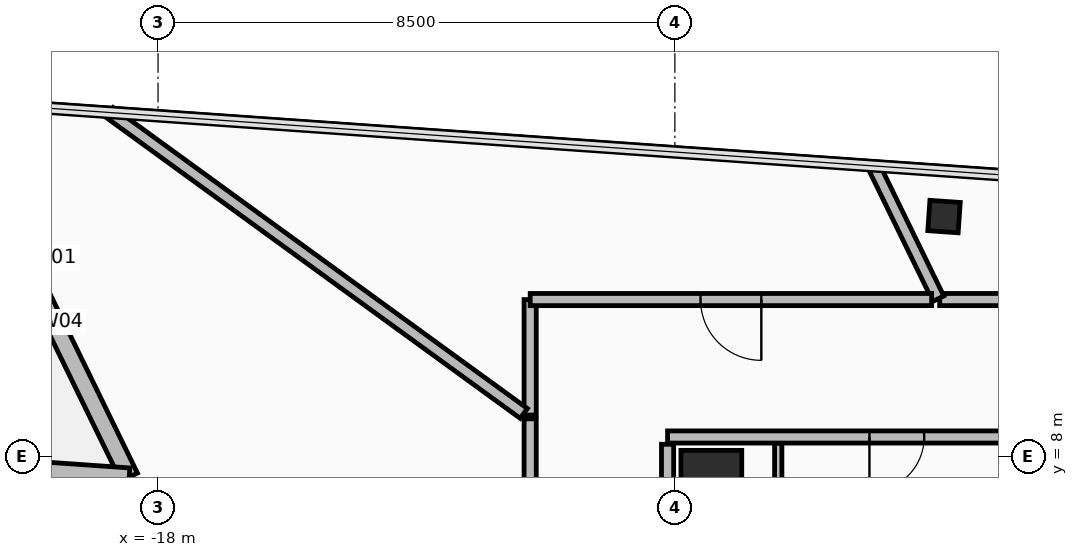
"""IFC4 building model, lengths in metres.
Left out: names, types, materials, properties, quantities, classifications, styles, units other than length and angle.
Written with IfcOpenShell. Run it as: python <this file> out.ifc"""

import sys

from ifc_helpers import new_model, si_unit, direction, frame, frame_2d, origin, origin_2d, place, context, subcontext, project, spatial, rectangle, hollow_rectangle, extrude, element, fill, save


model = new_model("IFC4")
c1 = context("Model", 3, precision=1e-05, world=origin(), true_north=direction((0.0, 1.0)))
c2 = subcontext(c1, "Body", "Model", "MODEL_VIEW")
j1 = project(units=[si_unit("LENGTHUNIT", "METRE"), si_unit("PLANEANGLEUNIT", "RADIAN")], contexts=[c1])
p1 = place(None, origin())
s1 = spatial("IfcSite", under=j1, at=p1, CompositionType="ELEMENT")
p2 = place(p1, origin())
s2 = spatial("IfcBuilding", under=s1, at=p2, CompositionType="ELEMENT")
p3 = place(p2, frame((0.0, 0.0, 227.05)))
s3 = spatial("IfcBuildingStorey", under=s2, at=p3, CompositionType="ELEMENT", Elevation=227.05)
p4 = place(p3, frame((-8.9, 7.6, 0.0), z_axis=(0.0, 0.0, 1.0), x_axis=(1.0, 0.0, 0.0)))
e1 = element("IfcColumn", 1, at=p4, inside=s3, PredefinedType="COLUMN", context=c2, shape_type="SweptSolid", body=[
    extrude(rectangle(XDim=1.0, YDim=1.0, at=origin_2d()), origin(), (0.0, 0.0, 1.0), 3.6),
])
p5 = place(p3, frame((-5.073, 11.945, 0.0), z_axis=(0.0, 0.0, 1.0), x_axis=(-0.99756405026, 0.069756473744, 0.0)))
e2 = element("IfcColumn", 2, at=p5, inside=s3, PredefinedType="COLUMN", context=c2, shape_type="SweptSolid", body=[
    extrude(hollow_rectangle(XDim=0.5, YDim=0.5, WallThickness=0.032, at=origin_2d()), origin(), (0.0, 0.0, 1.0), 3.6),
])
p6 = place(p3, frame((-21.49, 13.844, 0.0), z_axis=(0.0, 0.0, 1.0), x_axis=(0.438391471143, -0.898784133165, 0.0)))
e3 = element("IfcWall", 3, at=p6, inside=s3, PredefinedType="STANDARD", context=c2, shape_type="SweptSolid", body=[
    extrude(rectangle(XDim=6.88, YDim=0.3, at=frame_2d((3.44, 0.0))), origin(), (0.0, 0.0, 1.0), 2.765),
])
p7 = place(p6, frame((2.84, 0.0, 0.485)))
e4 = element("IfcOpeningElement", 4, at=p7, cuts=e3, PredefinedType="OPENING", context=c2, shape_type="SweptSolid", body=[
    extrude(rectangle(XDim=1.2, YDim=2.1, at=frame_2d((0.6, 1.05))), frame((0.0, 0.16, 0.0), z_axis=(0.0, -1.0, 0.0), x_axis=(1.0, 0.0, 0.0)), (0.0, 0.0, 1.0), 0.32),
])
p8 = place(p3, frame((-18.474, 7.661, 0.0), z_axis=(0.0, 0.0, 1.0), x_axis=(-0.997565982203, 0.069728840176, 0.0)))
e5 = element("IfcWall", 5, at=p8, inside=s3, PredefinedType="STANDARD", context=c2, shape_type="SweptSolid", body=[
    extrude(rectangle(XDim=6.88, YDim=0.3, at=frame_2d((3.44, 0.0))), origin(), (0.0, 0.0, 1.0), 2.765),
])
p9 = place(p8, frame((2.532, 0.0, 0.0)))
e6 = element("IfcOpeningElement", 6, at=p9, cuts=e5, PredefinedType="OPENING", context=c2, shape_type="SweptSolid", body=[
    extrude(rectangle(XDim=1.1, YDim=2.2, at=frame_2d((0.55, 1.1))), frame((0.0, 0.16, 0.0), z_axis=(0.0, -1.0, 0.0), x_axis=(1.0, 0.0, 0.0)), (0.0, 0.0, 1.0), 0.32),
])
p10 = place(p3, frame((9.62, 8.32, 0.0), z_axis=(0.0, 0.0, 1.0), x_axis=(-1.0, 0.0, 0.0)))
e7 = element("IfcWall", 7, at=p10, inside=s3, PredefinedType="PARTITIONING", context=c2, shape_type="SweptSolid", body=[
    extrude(rectangle(XDim=19.24, YDim=0.2, at=frame_2d((9.62, 0.0))), origin(), (0.0, 0.0, 1.0), 2.915),
])
p11 = place(p10, frame((10.97, 0.0, 0.0)))
e8 = element("IfcOpeningElement", 8, at=p11, cuts=e7, PredefinedType="OPENING", context=c2, shape_type="SweptSolid", body=[
    extrude(rectangle(XDim=0.9, YDim=2.1, at=frame_2d((0.45, 1.05))), frame((0.0, 0.11, 0.0), z_axis=(0.0, -1.0, 0.0), x_axis=(1.0, 0.0, 0.0)), (0.0, 0.0, 1.0), 0.22),
])
p12 = place(p10, frame((7.57, 0.0, 0.0)))
e9 = element("IfcOpeningElement", 9, at=p12, cuts=e7, PredefinedType="OPENING", context=c2, shape_type="SweptSolid", body=[
    extrude(rectangle(XDim=0.9, YDim=2.1, at=frame_2d((0.45, 1.05))), frame((0.0, 0.11, 0.0), z_axis=(0.0, -1.0, 0.0), x_axis=(1.0, 0.0, 0.0)), (0.0, 0.0, 1.0), 0.22),
])
p13 = place(p10, frame((15.02, 0.0, 0.0)))
e10 = element("IfcOpeningElement", 10, at=p13, cuts=e7, PredefinedType="OPENING", context=c2, shape_type="SweptSolid", body=[
    extrude(rectangle(XDim=0.9, YDim=2.1, at=frame_2d((0.45, 1.05))), frame((0.0, 0.11, 0.0), z_axis=(0.0, -1.0, 0.0), x_axis=(1.0, 0.0, 0.0)), (0.0, 0.0, 1.0), 0.22),
])
p14 = place(p3, frame((-9.62, 8.2, 0.0), z_axis=(0.0, 0.0, 1.0), x_axis=(0.0, -1.0, 0.0)))
e11 = element("IfcWall", 11, at=p14, inside=s3, PredefinedType="PARTITIONING", context=c2, shape_type="SweptSolid", body=[
    extrude(rectangle(XDim=16.4, YDim=0.2, at=frame_2d((8.2, 0.0))), origin(), (0.0, 0.0, 1.0), 2.765),
])
p15 = place(p14, frame((12.65, 0.0, 0.0)))
e12 = element("IfcOpeningElement", 12, at=p15, cuts=e11, PredefinedType="OPENING", context=c2, shape_type="SweptSolid", body=[
    extrude(rectangle(XDim=1.1, YDim=2.15, at=frame_2d((0.55, 1.075))), frame((0.0, 0.11, 0.0), z_axis=(0.0, -1.0, 0.0), x_axis=(1.0, 0.0, 0.0)), (0.0, 0.0, 1.0), 0.22),
])
p16 = place(p3, frame((-7.8, 8.215, 0.0), z_axis=(0.0, 0.0, 1.0), x_axis=(0.0, -1.0, 0.0)))
e13 = element("IfcWall", 13, at=p16, inside=s3, PredefinedType="PARTITIONING", context=c2, shape_type="SweptSolid", body=[
    extrude(rectangle(XDim=3.95, YDim=0.12, at=frame_2d((1.975, 0.0))), origin(), (0.0, 0.0, 1.0), 2.715),
])
p17 = place(p3, frame((0.16, 10.58, 0.0), z_axis=(0.0, 0.0, 1.0), x_axis=(-1.0, 0.0, 0.0)))
e14 = element("IfcWall", 14, at=p17, inside=s3, PredefinedType="PARTITIONING", context=c2, shape_type="SweptSolid", body=[
    extrude(rectangle(XDim=5.305, YDim=0.2, at=frame_2d((2.652, 0.0))), origin(), (0.0, 0.0, 1.0), 3.42),
])
p18 = place(p17, frame((2.052, 0.0, 0.0)))
e15 = element("IfcOpeningElement", 15, at=p18, cuts=e14, PredefinedType="OPENING", context=c2, shape_type="SweptSolid", body=[
    extrude(rectangle(XDim=1.2, YDim=2.15, at=frame_2d((0.6, 1.075))), frame((0.0, 0.11, 0.0), z_axis=(0.0, -1.0, 0.0), x_axis=(1.0, 0.0, 0.0)), (0.0, 0.0, 1.0), 0.22),
])
p19 = place(p3, frame((-5.167, 10.594, 0.0), z_axis=(0.0, 0.0, 1.0), x_axis=(-0.43834839389, 0.898805143273, 0.0)))
e16 = element("IfcWall", 16, at=p19, inside=s3, PredefinedType="PARTITIONING", context=c2, shape_type="SweptSolid", body=[
    extrude(rectangle(XDim=2.429, YDim=0.2, at=frame_2d((1.215, 0.0))), origin(), (0.0, 0.0, 1.0), 2.765),
])
p20 = place(p3, frame((-11.88, 10.579, 0.0), z_axis=(0.0, 0.0, 1.0), x_axis=(0.0, -1.0, 0.0)))
e17 = element("IfcWall", 17, at=p20, inside=s3, PredefinedType="PARTITIONING", context=c2, shape_type="SweptSolid", body=[
    extrude(rectangle(XDim=1.899, YDim=0.2, at=frame_2d((0.949, 0.0))), origin(), (0.0, 0.0, 1.0), 2.915),
])
p21 = place(p3, frame((-11.985, 8.708, 0.0), z_axis=(0.0, 0.0, 1.0), x_axis=(-0.809008125834, 0.587797458599, 0.0)))
e18 = element("IfcWall", 18, at=p21, inside=s3, PredefinedType="PARTITIONING", context=c2, shape_type="SweptSolid", body=[
    extrude(rectangle(XDim=8.419, YDim=0.2, at=frame_2d((4.209, 0.0))), origin(), (0.0, 0.0, 1.0), 2.765),
])
p22 = place(p3, frame((-5.277, 10.58, 0.0), z_axis=(0.0, 0.0, 1.0), x_axis=(-1.0, 0.0, 0.0)))
e19 = element("IfcWall", 19, at=p22, inside=s3, PredefinedType="PARTITIONING", context=c2, shape_type="SweptSolid", body=[
    extrude(rectangle(XDim=6.602, YDim=0.2, at=frame_2d((3.301, 0.0))), origin(), (0.0, 0.0, 1.0), 2.915),
])
p23 = place(p22, frame((2.801, 0.0, 0.0)))
e20 = element("IfcOpeningElement", 20, at=p23, cuts=e19, PredefinedType="OPENING", context=c2, shape_type="SweptSolid", body=[
    extrude(rectangle(XDim=1.0, YDim=2.15, at=frame_2d((0.5, 1.075))), frame((0.0, 0.11, 0.0), z_axis=(0.0, -1.0, 0.0), x_axis=(1.0, 0.0, 0.0)), (0.0, 0.0, 1.0), 0.22),
])
p24 = place(p3, frame((-11.88, 8.619, 0.0), z_axis=(0.0, 0.0, 1.0), x_axis=(0.0, -1.0, 0.0)))
e21 = element("IfcWall", 21, at=p24, inside=s3, PredefinedType="PARTITIONING", context=c2, shape_type="SweptSolid", body=[
    extrude(rectangle(XDim=7.342, YDim=0.2, at=frame_2d((3.671, 0.0))), origin(), (0.0, 0.0, 1.0), 2.765),
])
p25 = place(p24, frame((3.071, 0.0, 0.0)))
e22 = element("IfcOpeningElement", 22, at=p25, cuts=e21, PredefinedType="OPENING", context=c2, shape_type="SweptSolid", body=[
    extrude(rectangle(XDim=1.2, YDim=2.15, at=frame_2d((0.6, 1.075))), frame((0.0, 0.11, 0.0), z_axis=(0.0, -1.0, 0.0), x_axis=(1.0, 0.0, 0.0)), (0.0, 0.0, 1.0), 0.22),
])
p26 = place(p7, origin())
e23 = element("IfcWindow", 23, at=p26, inside=s3, PartitioningType="SINGLE_PANEL", PredefinedType="WINDOW", context=c2, shape_type="SweptSolid", body=[
    extrude(rectangle(XDim=1.2, YDim=2.1, at=frame_2d((0.6, 1.05))), frame((0.0, 0.03, 0.0), z_axis=(0.0, -1.0, 0.0), x_axis=(1.0, 0.0, 0.0)), (0.0, 0.0, 1.0), 0.06),
])
fill(e4, e23)
p27 = place(p13, frame((0.9, 0.0, 0.0), z_axis=(0.0, 0.0, 1.0), x_axis=(-1.0, 0.0, 0.0)))
e24 = element("IfcDoor", 24, at=p27, inside=s3, OperationType="SINGLE_SWING_LEFT", PredefinedType="DOOR", context=c2, shape_type="SweptSolid", body=[
    extrude(rectangle(XDim=0.9, YDim=2.1, at=frame_2d((0.45, 1.05))), frame((0.0, 0.025, 0.0), z_axis=(0.0, -1.0, 0.0), x_axis=(1.0, 0.0, 0.0)), (0.0, 0.0, 1.0), 0.05),
])
fill(e10, e24)
p28 = place(p23, origin())
e25 = element("IfcDoor", 25, at=p28, inside=s3, OperationType="SINGLE_SWING_RIGHT", PredefinedType="DOOR", context=c2, shape_type="SweptSolid", body=[
    extrude(rectangle(XDim=1.0, YDim=2.15, at=frame_2d((0.5, 1.075))), frame((0.0, 0.025, 0.0), z_axis=(0.0, -1.0, 0.0), x_axis=(1.0, 0.0, 0.0)), (0.0, 0.0, 1.0), 0.05),
])
fill(e20, e25)
save(model, sys.argv[1])
